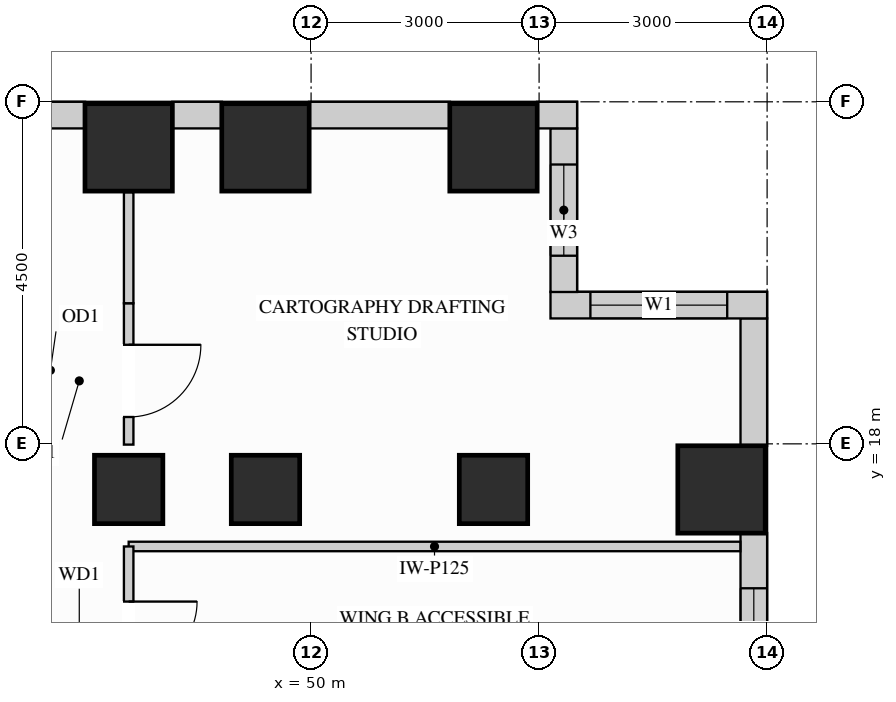
"""IFC4 building model, lengths in metres.
Left out: names, types, materials, properties, quantities, classifications, styles, units other than length and angle.
Written with IfcOpenShell. Run it as: python <this file> out.ifc"""

import sys

from ifc_helpers import new_model, si_unit, direction, frame, frame_2d, origin, origin_2d, place, context, subcontext, project, spatial, rectangle, extrude, source, transform, mapped, element, fill, save


model = new_model("IFC4")
c1 = context("Model", 3, precision=1e-05, world=origin(), true_north=direction((0.0, 1.0)))
c2 = subcontext(c1, "Body", "Model", "MODEL_VIEW")
j1 = project(units=[si_unit("LENGTHUNIT", "METRE"), si_unit("PLANEANGLEUNIT", "RADIAN")], contexts=[c1])
p1 = place(None, origin())
s1 = spatial("IfcSite", under=j1, at=p1, CompositionType="ELEMENT")
p2 = place(p1, origin())
s2 = spatial("IfcBuilding", under=s1, at=p2, CompositionType="ELEMENT")
p3 = place(p2, frame((0.0, 0.0, 135.0)))
s3 = spatial("IfcBuildingStorey", under=s2, at=p3, CompositionType="ELEMENT", Elevation=135.0)
m1 = source(origin(), c2, "Body", "SweptSolid", [
    extrude(rectangle(XDim=0.9, YDim=0.9, at=origin_2d()), origin(), (0.0, 0.0, 1.0), 3.32),
])
for number, where, z_axis, x_axis in (
    (1, (47.6, 17.4, 0.0), (0.0, 0.0, 1.0), (1.0, 0.0, 0.0)),
    (2, (49.4, 17.4, 0.0), (0.0, 0.0, 1.0), (1.0, 0.0, 0.0)),
    (3, (52.4, 17.4, 0.0), (0.0, 0.0, 1.0), (1.0, 0.0, 0.0)),
):
    element("IfcColumn", number, at=place(p3, frame(where, z_axis=z_axis, x_axis=x_axis)), inside=s3, PredefinedType="COLUMN", context=c2, shape_type="MappedRepresentation", body=[
        mapped(m1, transform((0.0, 0.0, 0.0), x_axis=(1.0, 0.0, 0.0), y_axis=(0.0, 1.0, 0.0), z_axis=(0.0, 0.0, 1.0))),
    ])
m2 = source(origin(), c2, "Body", "SweptSolid", [
    extrude(rectangle(XDim=1.15, YDim=1.15, at=origin_2d()), origin(), (0.0, 0.0, 1.0), 3.32),
])
for number, where, z_axis, x_axis in (
    (4, (47.6, 21.9, 0.0), (0.0, 0.0, 1.0), (1.0, 0.0, 0.0)),
    (5, (49.4, 21.9, 0.0), (0.0, 0.0, 1.0), (1.0, 0.0, 0.0)),
    (6, (52.4, 21.9, 0.0), (0.0, 0.0, 1.0), (1.0, 0.0, 0.0)),
    (7, (55.4, 17.4, 0.0), (0.0, 0.0, 1.0), (1.0, 0.0, 0.0)),
):
    element("IfcColumn", number, at=place(p3, frame(where, z_axis=z_axis, x_axis=x_axis)), inside=s3, PredefinedType="COLUMN", context=c2, shape_type="MappedRepresentation", body=[
        mapped(m2, transform((0.0, 0.0, 0.0), x_axis=(1.0, 0.0, 0.0), y_axis=(0.0, 1.0, 0.0), z_axis=(0.0, 0.0, 1.0))),
    ])
p4 = place(p3, frame((55.825, 14.073, 0.0), z_axis=(0.0, 0.0, 1.0), x_axis=(0.0, 1.0, 0.0)))
e8 = element("IfcWall", 8, at=p4, inside=s3, PredefinedType="SOLIDWALL", context=c2, shape_type="SweptSolid", body=[
    extrude(rectangle(XDim=2.754, YDim=0.35, at=frame_2d((1.377, 0.0))), origin(), (0.0, 0.0, 1.0), 3.305),
])
p5 = place(p4, frame((0.827, 0.0, 0.78)))
e9 = element("IfcOpeningElement", 9, at=p5, cuts=e8, PredefinedType="OPENING", context=c2, shape_type="SweptSolid", body=[
    extrude(rectangle(XDim=1.2, YDim=2.1, at=frame_2d((0.6, 1.05))), frame((0.0, 0.185, 0.0), z_axis=(0.0, -1.0, 0.0), x_axis=(1.0, 0.0, 0.0)), (0.0, 0.0, 1.0), 0.37),
])
m3 = source(origin(), c2, "Body", "SweptSolid", [
    extrude(rectangle(XDim=1.679, YDim=0.35, at=frame_2d((0.84, 0.0))), origin(), (0.0, 0.0, 1.0), 3.305),
])
p6 = place(p3, frame((55.825, 17.973, 0.0), z_axis=(0.0, 0.0, 1.0), x_axis=(0.0, 1.0, 0.0)))
e10 = element("IfcWall", 10, at=p6, inside=s3, PredefinedType="SOLIDWALL", context=c2, shape_type="MappedRepresentation", body=[
    mapped(m3, transform((0.0, 0.0, 0.0), x_axis=(1.0, 0.0, 0.0), y_axis=(0.0, 1.0, 0.0), z_axis=(0.0, 0.0, 1.0))),
])
p7 = place(p3, frame((56.0, 19.825, 0.0), z_axis=(0.0, 0.0, 1.0), x_axis=(-1.0, 0.0, 0.0)))
e11 = element("IfcWall", 11, at=p7, inside=s3, PredefinedType="SOLIDWALL", context=c2, shape_type="SweptSolid", body=[
    extrude(rectangle(XDim=2.85, YDim=0.35, at=frame_2d((1.425, 0.0))), origin(), (0.0, 0.0, 1.0), 3.305),
])
p8 = place(p7, frame((0.525, 0.0, 0.78)))
e12 = element("IfcOpeningElement", 12, at=p8, cuts=e11, PredefinedType="OPENING", context=c2, shape_type="SweptSolid", body=[
    extrude(rectangle(XDim=1.8, YDim=2.1, at=frame_2d((0.9, 1.05))), frame((0.0, 0.185, 0.0), z_axis=(0.0, -1.0, 0.0), x_axis=(1.0, 0.0, 0.0)), (0.0, 0.0, 1.0), 0.37),
])
p9 = place(p3, frame((53.325, 19.998, 0.0), z_axis=(0.0, 0.0, 1.0), x_axis=(0.0, 1.0, 0.0)))
e13 = element("IfcWall", 13, at=p9, inside=s3, PredefinedType="SOLIDWALL", context=c2, shape_type="SweptSolid", body=[
    extrude(rectangle(XDim=2.154, YDim=0.35, at=frame_2d((1.077, 0.0))), origin(), (0.0, 0.0, 1.0), 3.305),
])
p10 = place(p9, frame((0.477, 0.0, 0.78)))
e14 = element("IfcOpeningElement", 14, at=p10, cuts=e13, PredefinedType="OPENING", context=c2, shape_type="SweptSolid", body=[
    extrude(rectangle(XDim=1.2, YDim=2.1, at=frame_2d((0.6, 1.05))), frame((0.0, 0.185, 0.0), z_axis=(0.0, -1.0, 0.0), x_axis=(1.0, 0.0, 0.0)), (0.0, 0.0, 1.0), 0.37),
])
m4 = source(origin(), c2, "Body", "SweptSolid", [
    extrude(rectangle(XDim=0.527, YDim=0.35, at=frame_2d((0.264, 0.0))), origin(), (0.0, 0.0, 1.0), 3.305),
])
p11 = place(p3, frame((53.5, 22.325, 0.0), z_axis=(0.0, 0.0, 1.0), x_axis=(-1.0, 0.0, 0.0)))
e15 = element("IfcWall", 15, at=p11, inside=s3, PredefinedType="SOLIDWALL", context=c2, shape_type="MappedRepresentation", body=[
    mapped(m4, transform((0.0, 0.0, 0.0), x_axis=(1.0, 0.0, 0.0), y_axis=(0.0, 1.0, 0.0), z_axis=(0.0, 0.0, 1.0))),
])
m5 = source(origin(), c2, "Body", "SweptSolid", [
    extrude(rectangle(XDim=1.854, YDim=0.35, at=frame_2d((0.927, 0.0))), origin(), (0.0, 0.0, 1.0), 3.305),
])
p12 = place(p3, frame((51.827, 22.325, 0.0), z_axis=(0.0, 0.0, 1.0), x_axis=(-1.0, 0.0, 0.0)))
e16 = element("IfcWall", 16, at=p12, inside=s3, PredefinedType="SOLIDWALL", context=c2, shape_type="MappedRepresentation", body=[
    mapped(m5, transform((0.0, 0.0, 0.0), x_axis=(1.0, 0.0, 0.0), y_axis=(0.0, 1.0, 0.0), z_axis=(0.0, 0.0, 1.0))),
])
m6 = source(origin(), c2, "Body", "SweptSolid", [
    extrude(rectangle(XDim=0.654, YDim=0.35, at=frame_2d((0.327, 0.0))), origin(), (0.0, 0.0, 1.0), 3.305),
])
p13 = place(p3, frame((48.827, 22.325, 0.0), z_axis=(0.0, 0.0, 1.0), x_axis=(-1.0, 0.0, 0.0)))
e17 = element("IfcWall", 17, at=p13, inside=s3, PredefinedType="SOLIDWALL", context=c2, shape_type="MappedRepresentation", body=[
    mapped(m6, transform((0.0, 0.0, 0.0), x_axis=(1.0, 0.0, 0.0), y_axis=(0.0, 1.0, 0.0), z_axis=(0.0, 0.0, 1.0))),
])
p14 = place(p3, frame((47.027, 22.325, 0.0), z_axis=(0.0, 0.0, 1.0), x_axis=(-1.0, 0.0, 0.0)))
e18 = element("IfcWall", 18, at=p14, inside=s3, PredefinedType="SOLIDWALL", context=c2, shape_type="SweptSolid", body=[
    extrude(rectangle(XDim=6.454, YDim=0.35, at=frame_2d((3.227, 0.0))), origin(), (0.0, 0.0, 1.0), 3.305),
])
p15 = place(p14, frame((1.749, 0.0, 0.78)))
e19 = element("IfcOpeningElement", 19, at=p15, cuts=e18, PredefinedType="OPENING", context=c2, shape_type="SweptSolid", body=[
    extrude(rectangle(XDim=1.8, YDim=2.1, at=frame_2d((0.9, 1.05))), frame((0.0, 0.185, 0.0), z_axis=(0.0, -1.0, 0.0), x_axis=(1.0, 0.0, 0.0)), (0.0, 0.0, 1.0), 0.37),
])
p16 = place(p14, frame((3.942, 0.0, 0.78)))
e20 = element("IfcOpeningElement", 20, at=p16, cuts=e18, PredefinedType="OPENING", context=c2, shape_type="SweptSolid", body=[
    extrude(rectangle(XDim=1.8, YDim=2.1, at=frame_2d((0.9, 1.05))), frame((0.0, 0.185, 0.0), z_axis=(0.0, -1.0, 0.0), x_axis=(1.0, 0.0, 0.0)), (0.0, 0.0, 1.0), 0.37),
])
m7 = source(origin(), c2, "Body", "SweptSolid", [
    extrude(rectangle(XDim=8.048, YDim=0.125, at=frame_2d((4.024, 0.0))), origin(), (0.0, 0.0, 1.0), 2.617),
])
p17 = place(p3, frame((47.6, 16.65, 0.0), z_axis=(0.0, 0.0, 1.0), x_axis=(1.0, 0.0, 0.0)))
e21 = element("IfcWall", 21, at=p17, inside=s3, PredefinedType="PARTITIONING", context=c2, shape_type="MappedRepresentation", body=[
    mapped(m7, transform((0.0, 0.0, 0.0), x_axis=(1.0, 0.0, 0.0), y_axis=(0.0, 1.0, 0.0), z_axis=(0.0, 0.0, 1.0))),
])
p18 = place(p3, frame((47.6, 17.99, 0.0), z_axis=(0.0, 0.0, 1.0), x_axis=(0.0, 1.0, 0.0)))
e22 = element("IfcWall", 22, at=p18, inside=s3, PredefinedType="PARTITIONING", context=c2, shape_type="SweptSolid", body=[
    extrude(rectangle(XDim=1.86, YDim=0.125, at=frame_2d((0.93, 0.0))), origin(), (0.0, 0.0, 1.0), 2.617),
])
p19 = place(p18, frame((0.363, 0.0, 0.0)))
e23 = element("IfcOpeningElement", 23, at=p19, cuts=e22, PredefinedType="OPENING", context=c2, shape_type="SweptSolid", body=[
    extrude(rectangle(XDim=0.95, YDim=2.15, at=frame_2d((0.475, 1.075))), frame((0.0, 0.073, 0.0), z_axis=(0.0, -1.0, 0.0), x_axis=(1.0, 0.0, 0.0)), (0.0, 0.0, 1.0), 0.145),
])
m8 = source(origin(), c2, "Body", "SweptSolid", [
    extrude(rectangle(XDim=1.46, YDim=0.125, at=frame_2d((0.73, 0.0))), origin(), (0.0, 0.0, 1.0), 2.617),
])
p20 = place(p3, frame((47.6, 19.85, 0.0), z_axis=(0.0, 0.0, 1.0), x_axis=(0.0, 1.0, 0.0)))
e24 = element("IfcWall", 24, at=p20, inside=s3, PredefinedType="PARTITIONING", context=c2, shape_type="MappedRepresentation", body=[
    mapped(m8, transform((0.0, 0.0, 0.0), x_axis=(1.0, 0.0, 0.0), y_axis=(0.0, 1.0, 0.0), z_axis=(0.0, 0.0, 1.0))),
])
p21 = place(p3, frame((47.6, 14.35, 0.0), z_axis=(0.0, 0.0, 1.0), x_axis=(0.0, 1.0, 0.0)))
e25 = element("IfcWall", 25, at=p21, inside=s3, PredefinedType="PARTITIONING", context=c2, shape_type="SweptSolid", body=[
    extrude(rectangle(XDim=2.3, YDim=0.125, at=frame_2d((1.15, 0.0))), origin(), (0.0, 0.0, 1.0), 2.617),
])
p22 = place(p21, frame((0.675, 0.0, 0.0)))
e26 = element("IfcOpeningElement", 26, at=p22, cuts=e25, PredefinedType="OPENING", context=c2, shape_type="SweptSolid", body=[
    extrude(rectangle(XDim=0.9, YDim=2.15, at=frame_2d((0.45, 1.075))), frame((0.0, 0.073, 0.0), z_axis=(0.0, -1.0, 0.0), x_axis=(1.0, 0.0, 0.0)), (0.0, 0.0, 1.0), 0.145),
])
m9 = source(origin(), c2, "Body", "SweptSolid", [
    extrude(rectangle(XDim=0.95, YDim=2.15, at=frame_2d((0.475, 1.075))), frame((0.0, 0.025, 0.0), z_axis=(0.0, -1.0, 0.0), x_axis=(1.0, 0.0, 0.0)), (0.0, 0.0, 1.0), 0.05),
])
p23 = place(p19, origin())
e27 = element("IfcDoor", 27, at=p23, inside=s3, OperationType="SINGLE_SWING_RIGHT", PredefinedType="DOOR", context=c2, shape_type="MappedRepresentation", body=[
    mapped(m9, transform((0.0, 0.0, 0.0), x_axis=(1.0, 0.0, 0.0), y_axis=(0.0, 1.0, 0.0), z_axis=(0.0, 0.0, 1.0))),
])
fill(e23, e27)
m10 = source(origin(), c2, "Body", "SweptSolid", [
    extrude(rectangle(XDim=0.9, YDim=2.15, at=frame_2d((0.45, 1.075))), frame((0.0, 0.025, 0.0), z_axis=(0.0, -1.0, 0.0), x_axis=(1.0, 0.0, 0.0)), (0.0, 0.0, 1.0), 0.05),
])
p24 = place(p22, origin())
e28 = element("IfcDoor", 28, at=p24, inside=s3, OperationType="SINGLE_SWING_RIGHT", PredefinedType="DOOR", context=c2, shape_type="MappedRepresentation", body=[
    mapped(m10, transform((0.0, 0.0, 0.0), x_axis=(1.0, 0.0, 0.0), y_axis=(0.0, 1.0, 0.0), z_axis=(0.0, 0.0, 1.0))),
])
fill(e26, e28)
m11 = source(origin(), c2, "Body", "SweptSolid", [
    extrude(rectangle(XDim=1.8, YDim=2.1, at=frame_2d((0.9, 1.05))), frame((0.0, 0.03, 0.0), z_axis=(0.0, -1.0, 0.0), x_axis=(1.0, 0.0, 0.0)), (0.0, 0.0, 1.0), 0.06),
])
p25 = place(p8, origin())
e29 = element("IfcWindow", 29, at=p25, inside=s3, PartitioningType="SINGLE_PANEL", PredefinedType="WINDOW", context=c2, shape_type="MappedRepresentation", body=[
    mapped(m11, transform((0.0, 0.0, 0.0), x_axis=(1.0, 0.0, 0.0), y_axis=(0.0, 1.0, 0.0), z_axis=(0.0, 0.0, 1.0))),
])
fill(e12, e29)
m12 = source(origin(), c2, "Body", "SweptSolid", [
    extrude(rectangle(XDim=1.2, YDim=2.1, at=frame_2d((0.6, 1.05))), frame((0.0, 0.03, 0.0), z_axis=(0.0, -1.0, 0.0), x_axis=(1.0, 0.0, 0.0)), (0.0, 0.0, 1.0), 0.06),
])
p26 = place(p5, origin())
e30 = element("IfcWindow", 30, at=p26, inside=s3, PartitioningType="SINGLE_PANEL", PredefinedType="WINDOW", context=c2, shape_type="MappedRepresentation", body=[
    mapped(m12, transform((0.0, 0.0, 0.0), x_axis=(1.0, 0.0, 0.0), y_axis=(0.0, 1.0, 0.0), z_axis=(0.0, 0.0, 1.0))),
])
fill(e9, e30)
p27 = place(p10, origin())
e31 = element("IfcWindow", 31, at=p27, inside=s3, PartitioningType="SINGLE_PANEL", PredefinedType="WINDOW", context=c2, shape_type="MappedRepresentation", body=[
    mapped(m12, transform((0.0, 0.0, 0.0), x_axis=(1.0, 0.0, 0.0), y_axis=(0.0, 1.0, 0.0), z_axis=(0.0, 0.0, 1.0))),
])
fill(e14, e31)
save(model, sys.argv[1])
